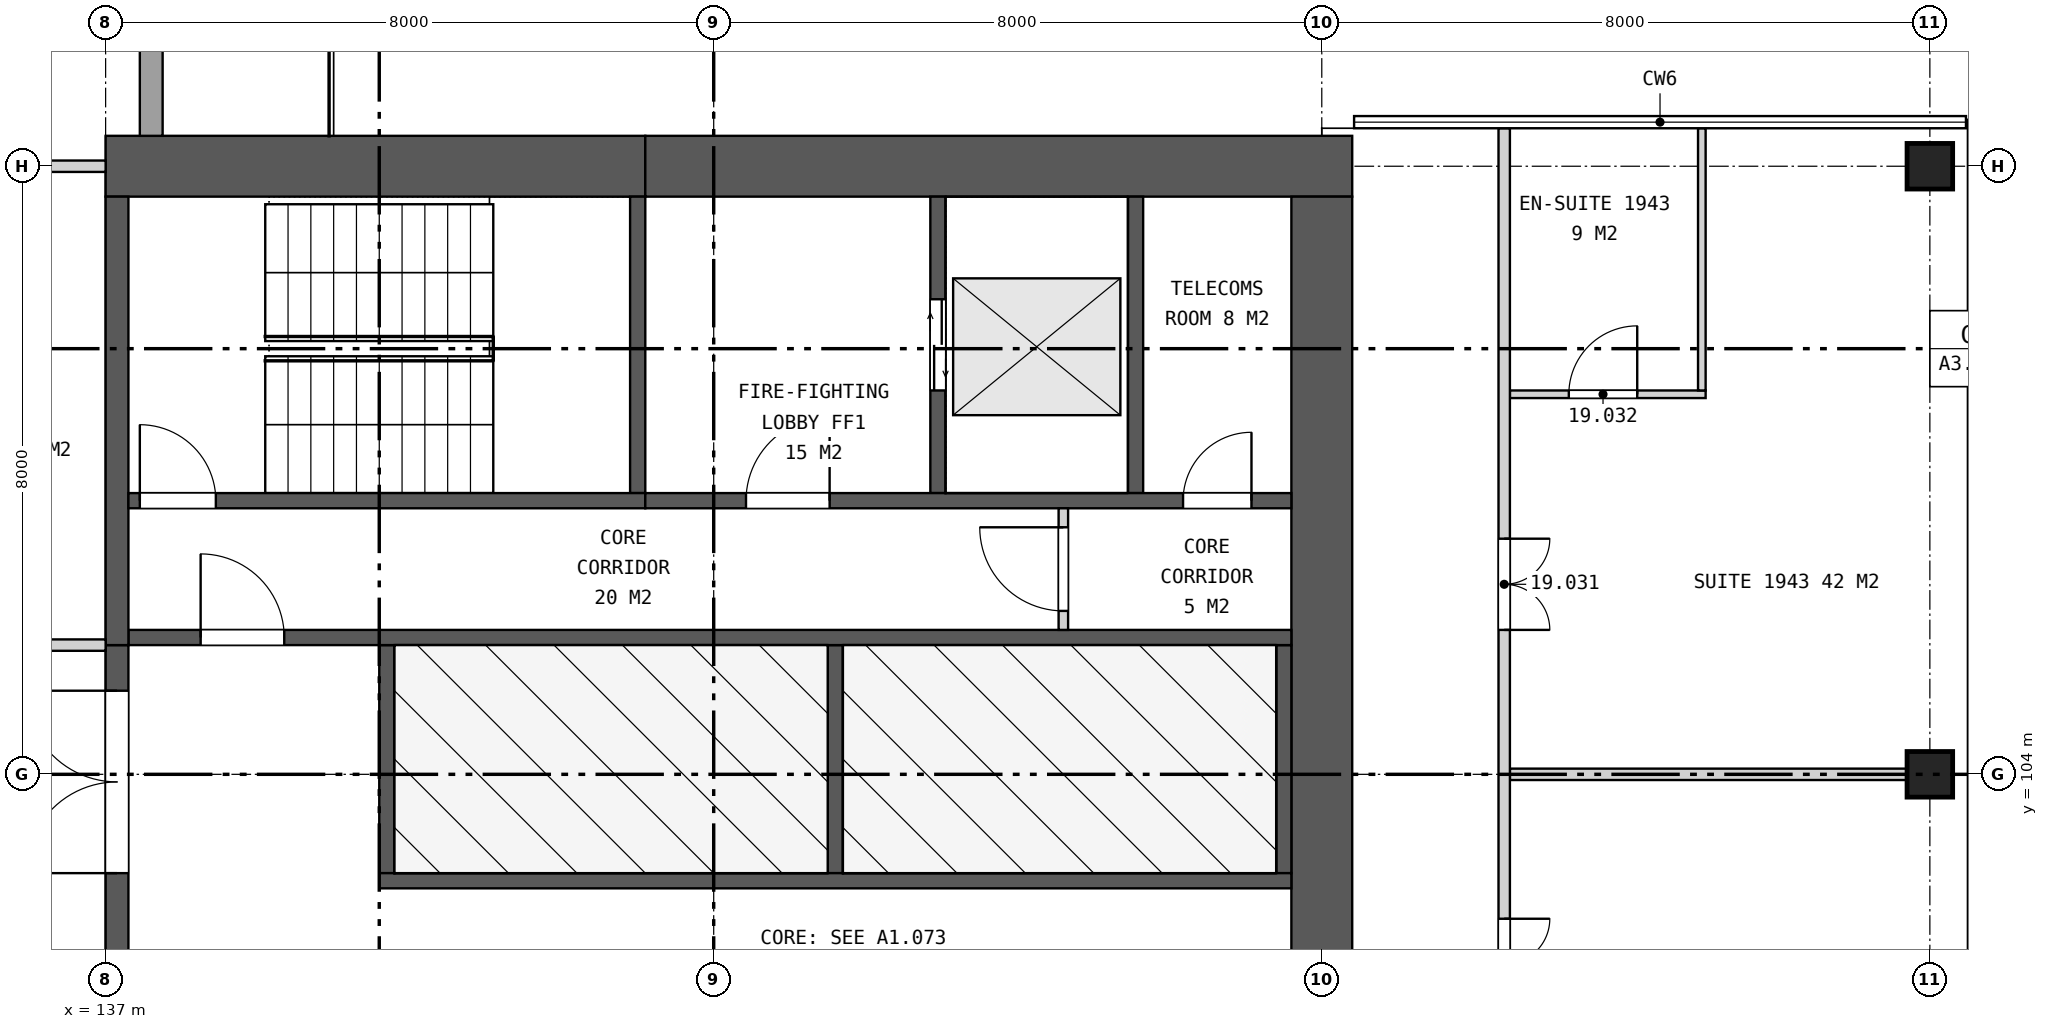
"""IFC4 building model, lengths in metres.
Left out: names, types, materials, properties, quantities, classifications, styles, units other than length and angle.
Written with IfcOpenShell. Run it as: python <this file> out.ifc"""

import sys

from ifc_helpers import new_model, si_unit, direction, frame, frame_2d, origin, origin_2d, place, context, subcontext, project, spatial, rectangle, extrude, element, fill, save


model = new_model("IFC4")
c1 = context("Model", 3, precision=1e-05, world=origin(), true_north=direction((0.0, 1.0)))
c2 = subcontext(c1, "Body", "Model", "MODEL_VIEW")
j1 = project(units=[si_unit("LENGTHUNIT", "METRE"), si_unit("PLANEANGLEUNIT", "RADIAN")], contexts=[c1])
p1 = place(None, origin())
s1 = spatial("IfcSite", under=j1, at=p1, CompositionType="ELEMENT")
p2 = place(p1, origin())
s2 = spatial("IfcBuilding", under=s1, at=p2, CompositionType="ELEMENT")
p3 = place(p2, frame((0.0, 0.0, 97.9)))
s3 = spatial("IfcBuildingStorey", under=s2, at=p3, CompositionType="ELEMENT", Elevation=97.9)
for number, where, z_axis, x_axis in (
    (1, (161.0, 104.0, 0.0), (0.0, 0.0, 1.0), (1.0, 0.0, 0.0)),
    (2, (161.0, 112.0, 0.0), (0.0, 0.0, 1.0), (1.0, 0.0, 0.0)),
):
    element("IfcColumn", number, at=place(p3, frame(where, z_axis=z_axis, x_axis=x_axis)), inside=s3, PredefinedType="COLUMN", context=c2, shape_type="SweptSolid", body=[
        extrude(rectangle(XDim=0.6, YDim=0.6, at=origin_2d()), origin(), (0.0, 0.0, 1.0), 3.7),
    ])
p4 = place(p3, frame((137.0, 112.0, 0.0), z_axis=(0.0, 0.0, 1.0), x_axis=(1.0, 0.0, 0.0)))
e3 = element("IfcWall", 3, at=p4, inside=s3, PredefinedType="SHEAR", context=c2, shape_type="SweptSolid", body=[
    extrude(rectangle(XDim=7.1, YDim=0.8, at=frame_2d((3.55, 0.0))), origin(), (0.0, 0.0, 1.0), 3.7),
])
p5 = place(p3, frame((144.1, 112.0, 0.0), z_axis=(0.0, 0.0, 1.0), x_axis=(1.0, 0.0, 0.0)))
e4 = element("IfcWall", 4, at=p5, inside=s3, PredefinedType="SHEAR", context=c2, shape_type="SweptSolid", body=[
    extrude(rectangle(XDim=9.3, YDim=0.8, at=frame_2d((4.65, 0.0))), origin(), (0.0, 0.0, 1.0), 3.7),
])
p6 = place(p3, frame((153.0, 88.4, 0.0), z_axis=(0.0, 0.0, 1.0), x_axis=(0.0, 1.0, 0.0)))
e5 = element("IfcWall", 5, at=p6, inside=s3, PredefinedType="SHEAR", context=c2, shape_type="SweptSolid", body=[
    extrude(rectangle(XDim=23.2, YDim=0.8, at=frame_2d((11.6, 0.0))), origin(), (0.0, 0.0, 1.0), 3.7),
])
p7 = place(p6, frame((10.4, 0.0, 0.0)))
e6 = element("IfcOpeningElement", 6, at=p7, cuts=e5, PredefinedType="OPENING", context=c2, shape_type="SweptSolid", body=[
    extrude(rectangle(XDim=2.4, YDim=2.4, at=frame_2d((1.2, 1.2))), frame((0.0, 0.41, 0.0), z_axis=(0.0, -1.0, 0.0), x_axis=(1.0, 0.0, 0.0)), (0.0, 0.0, 1.0), 0.82),
])
p8 = place(p3, frame((137.15, 94.3, 0.0), z_axis=(0.0, 0.0, 1.0), x_axis=(0.0, 1.0, 0.0)))
e7 = element("IfcWall", 7, at=p8, inside=s3, PredefinedType="SHEAR", context=c2, shape_type="SweptSolid", body=[
    extrude(rectangle(XDim=11.4, YDim=0.3, at=frame_2d((5.7, 0.0))), origin(), (0.0, 0.0, 1.0), 3.7),
])
p9 = place(p8, frame((0.6, 0.0, 0.0)))
e8 = element("IfcOpeningElement", 8, at=p9, cuts=e7, PredefinedType="OPENING", context=c2, shape_type="SweptSolid", body=[
    extrude(rectangle(XDim=2.4, YDim=2.4, at=frame_2d((1.2, 1.2))), frame((0.0, 0.16, 0.0), z_axis=(0.0, -1.0, 0.0), x_axis=(1.0, 0.0, 0.0)), (0.0, 0.0, 1.0), 0.32),
])
p10 = place(p8, frame((4.5, 0.0, 0.0)))
e9 = element("IfcOpeningElement", 9, at=p10, cuts=e7, PredefinedType="OPENING", context=c2, shape_type="SweptSolid", body=[
    extrude(rectangle(XDim=2.4, YDim=2.4, at=frame_2d((1.2, 1.2))), frame((0.0, 0.16, 0.0), z_axis=(0.0, -1.0, 0.0), x_axis=(1.0, 0.0, 0.0)), (0.0, 0.0, 1.0), 0.32),
])
p11 = place(p8, frame((8.4, 0.0, 0.0)))
e10 = element("IfcOpeningElement", 10, at=p11, cuts=e7, PredefinedType="OPENING", context=c2, shape_type="SweptSolid", body=[
    extrude(rectangle(XDim=2.4, YDim=2.4, at=frame_2d((1.2, 1.2))), frame((0.0, 0.16, 0.0), z_axis=(0.0, -1.0, 0.0), x_axis=(1.0, 0.0, 0.0)), (0.0, 0.0, 1.0), 0.32),
])
for number, where, z_axis, x_axis in (
    (11, (140.7, 102.7, 0.0), (0.0, 0.0, 1.0), (0.0, 1.0, 0.0)),
    (12, (146.6, 102.7, 0.0), (0.0, 0.0, 1.0), (0.0, 1.0, 0.0)),
    (13, (152.5, 102.7, 0.0), (0.0, 0.0, 1.0), (0.0, 1.0, 0.0)),
):
    element("IfcWall", number, at=place(p3, frame(where, z_axis=z_axis, x_axis=x_axis)), inside=s3, PredefinedType="SHEAR", context=c2, shape_type="SweptSolid", body=[
        extrude(rectangle(XDim=3.0, YDim=0.2, at=frame_2d((1.5, 0.0))), origin(), (0.0, 0.0, 1.0), 3.7),
    ])
p12 = place(p3, frame((140.6, 102.6, 0.0), z_axis=(0.0, 0.0, 1.0), x_axis=(1.0, 0.0, 0.0)))
e14 = element("IfcWall", 14, at=p12, inside=s3, PredefinedType="SHEAR", context=c2, shape_type="SweptSolid", body=[
    extrude(rectangle(XDim=12.0, YDim=0.2, at=frame_2d((6.0, 0.0))), origin(), (0.0, 0.0, 1.0), 3.7),
])
p13 = place(p3, frame((137.3, 105.8, 0.0), z_axis=(0.0, 0.0, 1.0), x_axis=(1.0, 0.0, 0.0)))
e15 = element("IfcWall", 15, at=p13, inside=s3, PredefinedType="SHEAR", context=c2, shape_type="SweptSolid", body=[
    extrude(rectangle(XDim=15.3, YDim=0.2, at=frame_2d((7.65, 0.0))), origin(), (0.0, 0.0, 1.0), 3.7),
])
p14 = place(p13, frame((0.95, 0.0, 0.0)))
e16 = element("IfcOpeningElement", 16, at=p14, cuts=e15, PredefinedType="OPENING", context=c2, shape_type="SweptSolid", body=[
    extrude(rectangle(XDim=1.1, YDim=2.1, at=frame_2d((0.55, 1.05))), frame((0.0, 0.11, 0.0), z_axis=(0.0, -1.0, 0.0), x_axis=(1.0, 0.0, 0.0)), (0.0, 0.0, 1.0), 0.22),
])
p15 = place(p3, frame((137.15, 105.7, 0.0), z_axis=(0.0, 0.0, 1.0), x_axis=(0.0, 1.0, 0.0)))
e17 = element("IfcWall", 17, at=p15, inside=s3, PredefinedType="SHEAR", context=c2, shape_type="SweptSolid", body=[
    extrude(rectangle(XDim=5.9, YDim=0.3, at=frame_2d((2.95, 0.0))), origin(), (0.0, 0.0, 1.0), 3.7),
])
p16 = place(p3, frame((144.0, 107.7, 0.0), z_axis=(0.0, 0.0, 1.0), x_axis=(0.0, 1.0, 0.0)))
e18 = element("IfcWall", 18, at=p16, inside=s3, PredefinedType="SHEAR", context=c2, shape_type="SweptSolid", body=[
    extrude(rectangle(XDim=3.9, YDim=0.2, at=frame_2d((1.95, 0.0))), origin(), (0.0, 0.0, 1.0), 3.7),
])
p17 = place(p3, frame((147.95, 107.7, 0.0), z_axis=(0.0, 0.0, 1.0), x_axis=(0.0, 1.0, 0.0)))
e19 = element("IfcWall", 19, at=p17, inside=s3, PredefinedType="SHEAR", context=c2, shape_type="SweptSolid", body=[
    extrude(rectangle(XDim=3.9, YDim=0.2, at=frame_2d((1.95, 0.0))), origin(), (0.0, 0.0, 1.0), 3.7),
])
p18 = place(p17, frame((1.35, 0.0, 0.0)))
e20 = element("IfcOpeningElement", 20, at=p18, cuts=e19, PredefinedType="OPENING", context=c2, shape_type="SweptSolid", body=[
    extrude(rectangle(XDim=1.2, YDim=2.1, at=frame_2d((0.6, 1.05))), frame((0.0, 0.11, 0.0), z_axis=(0.0, -1.0, 0.0), x_axis=(1.0, 0.0, 0.0)), (0.0, 0.0, 1.0), 0.22),
])
p19 = place(p3, frame((150.55, 107.7, 0.0), z_axis=(0.0, 0.0, 1.0), x_axis=(0.0, 1.0, 0.0)))
e21 = element("IfcWall", 21, at=p19, inside=s3, PredefinedType="SHEAR", context=c2, shape_type="SweptSolid", body=[
    extrude(rectangle(XDim=3.9, YDim=0.2, at=frame_2d((1.95, 0.0))), origin(), (0.0, 0.0, 1.0), 3.7),
])
p20 = place(p3, frame((137.3, 107.6, 0.0), z_axis=(0.0, 0.0, 1.0), x_axis=(1.0, 0.0, 0.0)))
e22 = element("IfcWall", 22, at=p20, inside=s3, PredefinedType="SHEAR", context=c2, shape_type="SweptSolid", body=[
    extrude(rectangle(XDim=6.8, YDim=0.2, at=frame_2d((3.4, 0.0))), origin(), (0.0, 0.0, 1.0), 3.7),
])
p21 = place(p20, frame((0.15, 0.0, 0.0)))
e23 = element("IfcOpeningElement", 23, at=p21, cuts=e22, PredefinedType="OPENING", context=c2, shape_type="SweptSolid", body=[
    extrude(rectangle(XDim=1.0, YDim=2.1, at=frame_2d((0.5, 1.05))), frame((0.0, 0.11, 0.0), z_axis=(0.0, -1.0, 0.0), x_axis=(1.0, 0.0, 0.0)), (0.0, 0.0, 1.0), 0.22),
])
p22 = place(p3, frame((144.1, 107.6, 0.0), z_axis=(0.0, 0.0, 1.0), x_axis=(1.0, 0.0, 0.0)))
e24 = element("IfcWall", 24, at=p22, inside=s3, PredefinedType="SHEAR", context=c2, shape_type="SweptSolid", body=[
    extrude(rectangle(XDim=8.5, YDim=0.2, at=frame_2d((4.25, 0.0))), origin(), (0.0, 0.0, 1.0), 3.7),
])
p23 = place(p22, frame((1.325, 0.0, 0.0)))
e25 = element("IfcOpeningElement", 25, at=p23, cuts=e24, PredefinedType="OPENING", context=c2, shape_type="SweptSolid", body=[
    extrude(rectangle(XDim=1.1, YDim=2.1, at=frame_2d((0.55, 1.05))), frame((0.0, 0.11, 0.0), z_axis=(0.0, -1.0, 0.0), x_axis=(1.0, 0.0, 0.0)), (0.0, 0.0, 1.0), 0.22),
])
p24 = place(p22, frame((7.075, 0.0, 0.0)))
e26 = element("IfcOpeningElement", 26, at=p24, cuts=e24, PredefinedType="OPENING", context=c2, shape_type="SweptSolid", body=[
    extrude(rectangle(XDim=0.9, YDim=2.1, at=frame_2d((0.45, 1.05))), frame((0.0, 0.11, 0.0), z_axis=(0.0, -1.0, 0.0), x_axis=(1.0, 0.0, 0.0)), (0.0, 0.0, 1.0), 0.22),
])
p25 = place(p3, frame((149.6, 105.9, 0.0), z_axis=(0.0, 0.0, 1.0), x_axis=(0.0, 1.0, 0.0)))
e27 = element("IfcWall", 27, at=p25, inside=s3, PredefinedType="PARTITIONING", context=c2, shape_type="SweptSolid", body=[
    extrude(rectangle(XDim=1.6, YDim=0.125, at=frame_2d((0.8, 0.0))), origin(), (0.0, 0.0, 1.0), 3.7),
])
p26 = place(p25, frame((0.25, 0.0, 0.0)))
e28 = element("IfcOpeningElement", 28, at=p26, cuts=e27, PredefinedType="OPENING", context=c2, shape_type="SweptSolid", body=[
    extrude(rectangle(XDim=1.1, YDim=2.1, at=frame_2d((0.55, 1.05))), frame((0.0, 0.073, 0.0), z_axis=(0.0, -1.0, 0.0), x_axis=(1.0, 0.0, 0.0)), (0.0, 0.0, 1.0), 0.145),
])
p27 = place(p3, frame((137.6, 112.4, 0.0), z_axis=(0.0, 0.0, 1.0), x_axis=(0.0, 1.0, 0.0)))
e29 = element("IfcWall", 29, at=p27, inside=s3, PredefinedType="SOLIDWALL", context=c2, shape_type="SweptSolid", body=[
    extrude(rectangle(XDim=7.568, YDim=0.3, at=frame_2d((3.784, 0.0))), origin(), (0.0, 0.0, 1.0), 3.42),
])
p28 = place(p27, frame((2.55, 0.0, 0.0)))
e30 = element("IfcOpeningElement", 30, at=p28, cuts=e29, PredefinedType="OPENING", context=c2, shape_type="SweptSolid", body=[
    extrude(rectangle(XDim=2.1, YDim=2.4, at=frame_2d((1.05, 1.2))), frame((0.0, 0.16, 0.0), z_axis=(0.0, -1.0, 0.0), x_axis=(1.0, 0.0, 0.0)), (0.0, 0.0, 1.0), 0.32),
])
p29 = place(p3, frame((155.475, 104.0, 0.0), z_axis=(0.0, 0.0, 1.0), x_axis=(1.0, 0.0, 0.0)))
e31 = element("IfcWall", 31, at=p29, inside=s3, PredefinedType="PARTITIONING", context=c2, shape_type="SweptSolid", body=[
    extrude(rectangle(XDim=5.225, YDim=0.15, at=frame_2d((2.612, 0.0))), origin(), (0.0, 0.0, 1.0), 2.957),
])
p30 = place(p3, frame((131.325, 105.7, 0.0), z_axis=(0.0, 0.0, 1.0), x_axis=(1.0, 0.0, 0.0)))
e32 = element("IfcWall", 32, at=p30, inside=s3, PredefinedType="PARTITIONING", context=c2, shape_type="SweptSolid", body=[
    extrude(rectangle(XDim=5.675, YDim=0.15, at=frame_2d((2.837, 0.0))), origin(), (0.0, 0.0, 1.0), 3.7),
])
p31 = place(p3, frame((155.475, 109.0, 0.0), z_axis=(0.0, 0.0, 1.0), x_axis=(1.0, 0.0, 0.0)))
e33 = element("IfcWall", 33, at=p31, inside=s3, PredefinedType="PLUMBINGWALL", context=c2, shape_type="SweptSolid", body=[
    extrude(rectangle(XDim=2.575, YDim=0.1, at=frame_2d((1.288, 0.0))), origin(), (0.0, 0.0, 1.0), 3.7),
])
p32 = place(p31, frame((0.775, 0.0, 0.0)))
e34 = element("IfcOpeningElement", 34, at=p32, cuts=e33, PredefinedType="OPENING", context=c2, shape_type="SweptSolid", body=[
    extrude(rectangle(XDim=0.9, YDim=2.1, at=frame_2d((0.45, 1.05))), frame((0.0, 0.06, 0.0), z_axis=(0.0, -1.0, 0.0), x_axis=(1.0, 0.0, 0.0)), (0.0, 0.0, 1.0), 0.12),
])
p33 = place(p3, frame((131.475, 112.0, 0.0), z_axis=(0.0, 0.0, 1.0), x_axis=(1.0, 0.0, 0.0)))
e35 = element("IfcWall", 35, at=p33, inside=s3, PredefinedType="PARTITIONING", context=c2, shape_type="SweptSolid", body=[
    extrude(rectangle(XDim=5.525, YDim=0.15, at=frame_2d((2.762, 0.0))), origin(), (0.0, 0.0, 1.0), 2.957),
])
p34 = place(p3, frame((155.4, 87.5, 0.0), z_axis=(0.0, 0.0, 1.0), x_axis=(0.0, 1.0, 0.0)))
e36 = element("IfcWall", 36, at=p34, inside=s3, PredefinedType="PARTITIONING", context=c2, shape_type="SweptSolid", body=[
    extrude(rectangle(XDim=25.0, YDim=0.15, at=frame_2d((12.5, 0.0))), origin(), (0.0, 0.0, 1.0), 2.957),
])
p35 = place(p34, frame((2.4, 0.0, 0.0)))
e37 = element("IfcOpeningElement", 37, at=p35, cuts=e36, PredefinedType="OPENING", context=c2, shape_type="SweptSolid", body=[
    extrude(rectangle(XDim=1.2, YDim=2.2, at=frame_2d((0.6, 1.1))), frame((0.0, 0.085, 0.0), z_axis=(0.0, -1.0, 0.0), x_axis=(1.0, 0.0, 0.0)), (0.0, 0.0, 1.0), 0.17),
])
p36 = place(p34, frame((13.4, 0.0, 0.0)))
e38 = element("IfcOpeningElement", 38, at=p36, cuts=e36, PredefinedType="OPENING", context=c2, shape_type="SweptSolid", body=[
    extrude(rectangle(XDim=1.2, YDim=2.2, at=frame_2d((0.6, 1.1))), frame((0.0, 0.085, 0.0), z_axis=(0.0, -1.0, 0.0), x_axis=(1.0, 0.0, 0.0)), (0.0, 0.0, 1.0), 0.17),
])
p37 = place(p34, frame((18.4, 0.0, 0.0)))
e39 = element("IfcOpeningElement", 39, at=p37, cuts=e36, PredefinedType="OPENING", context=c2, shape_type="SweptSolid", body=[
    extrude(rectangle(XDim=1.2, YDim=2.2, at=frame_2d((0.6, 1.1))), frame((0.0, 0.085, 0.0), z_axis=(0.0, -1.0, 0.0), x_axis=(1.0, 0.0, 0.0)), (0.0, 0.0, 1.0), 0.17),
])
p38 = place(p3, frame((158.0, 109.05, 0.0), z_axis=(0.0, 0.0, 1.0), x_axis=(0.0, 1.0, 0.0)))
e40 = element("IfcWall", 40, at=p38, inside=s3, PredefinedType="PLUMBINGWALL", context=c2, shape_type="SweptSolid", body=[
    extrude(rectangle(XDim=3.45, YDim=0.1, at=frame_2d((1.725, 0.0))), origin(), (0.0, 0.0, 1.0), 2.963),
])
p39 = place(p11, origin())
e41 = element("IfcDoor", 41, at=p39, inside=s3, OperationType="DOUBLE_DOOR_SINGLE_SWING", PredefinedType="DOOR", context=c2, shape_type="SweptSolid", body=[
    extrude(rectangle(XDim=2.4, YDim=2.4, at=frame_2d((1.2, 1.2))), frame((0.0, 0.025, 0.0), z_axis=(0.0, -1.0, 0.0), x_axis=(1.0, 0.0, 0.0)), (0.0, 0.0, 1.0), 0.05),
])
fill(e10, e41)
p40 = place(p14, origin())
e42 = element("IfcDoor", 42, at=p40, inside=s3, OperationType="SINGLE_SWING_LEFT", PredefinedType="DOOR", context=c2, shape_type="SweptSolid", body=[
    extrude(rectangle(XDim=1.1, YDim=2.1, at=frame_2d((0.55, 1.05))), frame((0.0, 0.025, 0.0), z_axis=(0.0, -1.0, 0.0), x_axis=(1.0, 0.0, 0.0)), (0.0, 0.0, 1.0), 0.05),
])
fill(e16, e42)
p41 = place(p18, origin())
e43 = element("IfcDoor", 43, at=p41, inside=s3, OperationType="DOUBLE_DOOR_SLIDING", PredefinedType="DOOR", context=c2, shape_type="SweptSolid", body=[
    extrude(rectangle(XDim=1.2, YDim=2.1, at=frame_2d((0.6, 1.05))), frame((0.0, 0.025, 0.0), z_axis=(0.0, -1.0, 0.0), x_axis=(1.0, 0.0, 0.0)), (0.0, 0.0, 1.0), 0.05),
])
fill(e20, e43)
p42 = place(p21, origin())
e44 = element("IfcDoor", 44, at=p42, inside=s3, OperationType="SINGLE_SWING_LEFT", PredefinedType="DOOR", context=c2, shape_type="SweptSolid", body=[
    extrude(rectangle(XDim=1.0, YDim=2.1, at=frame_2d((0.5, 1.05))), frame((0.0, 0.025, 0.0), z_axis=(0.0, -1.0, 0.0), x_axis=(1.0, 0.0, 0.0)), (0.0, 0.0, 1.0), 0.05),
])
fill(e23, e44)
p43 = place(p23, origin())
e45 = element("IfcDoor", 45, at=p43, inside=s3, OperationType="SINGLE_SWING_RIGHT", PredefinedType="DOOR", context=c2, shape_type="SweptSolid", body=[
    extrude(rectangle(XDim=1.1, YDim=2.1, at=frame_2d((0.55, 1.05))), frame((0.0, 0.025, 0.0), z_axis=(0.0, -1.0, 0.0), x_axis=(1.0, 0.0, 0.0)), (0.0, 0.0, 1.0), 0.05),
])
fill(e25, e45)
p44 = place(p24, origin())
e46 = element("IfcDoor", 46, at=p44, inside=s3, OperationType="SINGLE_SWING_RIGHT", PredefinedType="DOOR", context=c2, shape_type="SweptSolid", body=[
    extrude(rectangle(XDim=0.9, YDim=2.1, at=frame_2d((0.45, 1.05))), frame((0.0, 0.025, 0.0), z_axis=(0.0, -1.0, 0.0), x_axis=(1.0, 0.0, 0.0)), (0.0, 0.0, 1.0), 0.05),
])
fill(e26, e46)
p45 = place(p26, origin())
e47 = element("IfcDoor", 47, at=p45, inside=s3, OperationType="SINGLE_SWING_RIGHT", PredefinedType="DOOR", context=c2, shape_type="SweptSolid", body=[
    extrude(rectangle(XDim=1.1, YDim=2.1, at=frame_2d((0.55, 1.05))), frame((0.0, 0.025, 0.0), z_axis=(0.0, -1.0, 0.0), x_axis=(1.0, 0.0, 0.0)), (0.0, 0.0, 1.0), 0.05),
])
fill(e28, e47)
p46 = place(p36, frame((1.2, 0.0, 0.0), z_axis=(0.0, 0.0, 1.0), x_axis=(-1.0, 0.0, 0.0)))
e48 = element("IfcDoor", 48, at=p46, inside=s3, OperationType="DOUBLE_DOOR_SINGLE_SWING", PredefinedType="DOOR", context=c2, shape_type="SweptSolid", body=[
    extrude(rectangle(XDim=1.2, YDim=2.2, at=frame_2d((0.6, 1.1))), frame((0.0, 0.025, 0.0), z_axis=(0.0, -1.0, 0.0), x_axis=(1.0, 0.0, 0.0)), (0.0, 0.0, 1.0), 0.05),
])
fill(e38, e48)
p47 = place(p37, frame((1.2, 0.0, 0.0), z_axis=(0.0, 0.0, 1.0), x_axis=(-1.0, 0.0, 0.0)))
e49 = element("IfcDoor", 49, at=p47, inside=s3, OperationType="DOUBLE_DOOR_SINGLE_SWING", PredefinedType="DOOR", context=c2, shape_type="SweptSolid", body=[
    extrude(rectangle(XDim=1.2, YDim=2.2, at=frame_2d((0.6, 1.1))), frame((0.0, 0.025, 0.0), z_axis=(0.0, -1.0, 0.0), x_axis=(1.0, 0.0, 0.0)), (0.0, 0.0, 1.0), 0.05),
])
fill(e39, e49)
p48 = place(p32, origin())
e50 = element("IfcDoor", 50, at=p48, inside=s3, OperationType="SINGLE_SWING_RIGHT", PredefinedType="DOOR", context=c2, shape_type="SweptSolid", body=[
    extrude(rectangle(XDim=0.9, YDim=2.1, at=frame_2d((0.45, 1.05))), frame((0.0, 0.025, 0.0), z_axis=(0.0, -1.0, 0.0), x_axis=(1.0, 0.0, 0.0)), (0.0, 0.0, 1.0), 0.05),
])
fill(e34, e50)
save(model, sys.argv[1])
